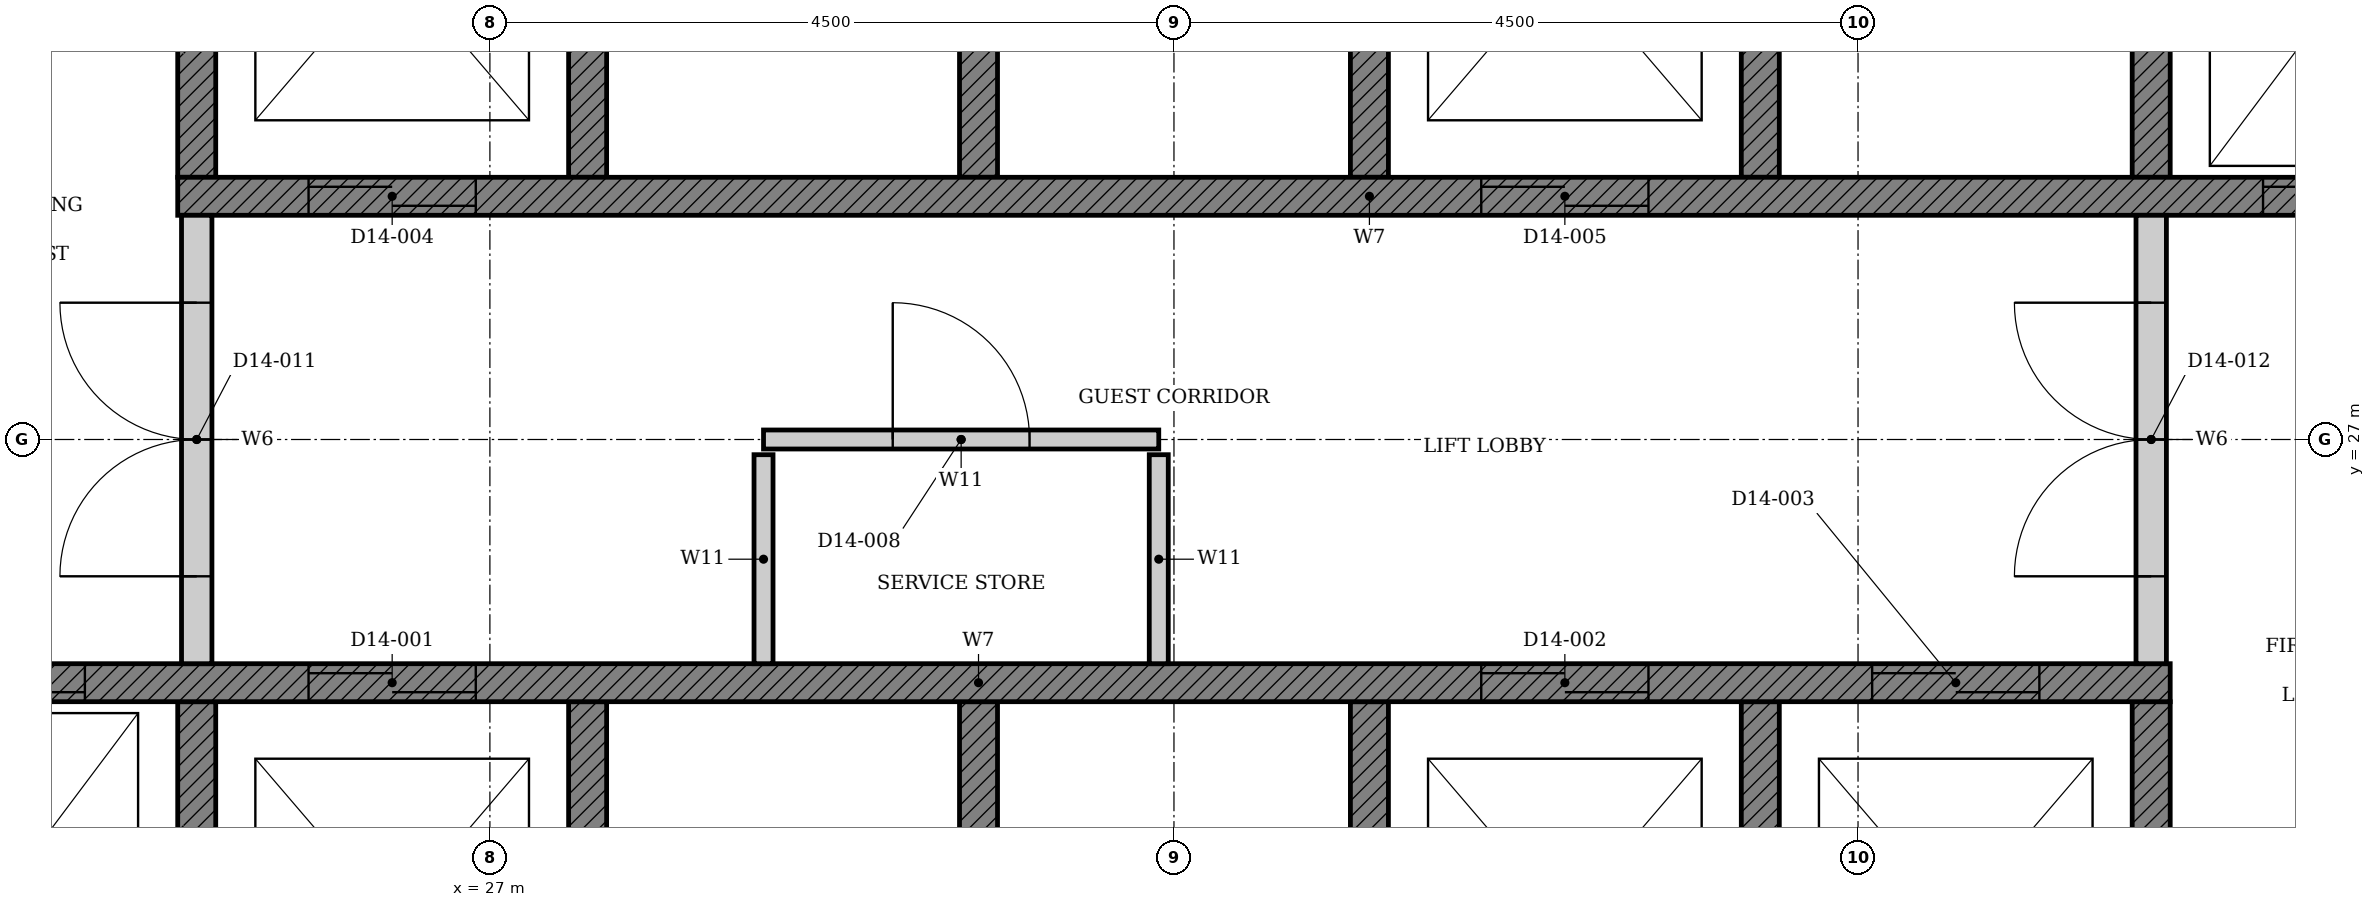
"""IFC4 building model, lengths in metres.
Left out: names, types, materials, properties, quantities, classifications, styles, units other than length and angle.
Written with IfcOpenShell. Run it as: python <this file> out.ifc"""

import sys

from ifc_helpers import new_model, si_unit, direction, frame, frame_2d, origin, place, context, subcontext, project, spatial, polyline, rectangle, outline, extrude, element, fill, save


model = new_model("IFC4")
c1 = context("Model", 3, precision=1e-05, world=origin(), true_north=direction((0.0, 1.0)))
c2 = subcontext(c1, "Body", "Model", "MODEL_VIEW")
j1 = project(units=[si_unit("LENGTHUNIT", "METRE"), si_unit("PLANEANGLEUNIT", "RADIAN")], contexts=[c1])
p1 = place(None, origin())
s1 = spatial("IfcSite", under=j1, at=p1, CompositionType="ELEMENT")
p2 = place(p1, origin())
s2 = spatial("IfcBuilding", under=s1, at=p2, CompositionType="ELEMENT")
p3 = place(p2, frame((0.0, 0.0, 63.6)))
s3 = spatial("IfcBuildingStorey", under=s2, at=p3, CompositionType="ELEMENT", Elevation=63.6)
p4 = place(p3, origin())
e1 = element("IfcWall", 1, at=p4, inside=s3, PredefinedType="SHEAR", context=c2, shape_type="SweptSolid", body=[
    extrude(outline(polyline([(22.375, 22.35), (38.053, 22.35), (38.053, 25.275), (37.803, 25.275), (37.803, 22.65), (35.482, 22.65), (35.482, 25.275), (35.232, 25.275), (35.232, 22.65), (32.911, 22.65), (32.911, 25.275), (32.661, 25.275), (32.661, 22.65), (30.339, 22.65), (30.339, 25.275), (30.089, 25.275), (30.089, 22.65), (27.768, 22.65), (27.768, 25.275), (27.518, 25.275), (27.518, 22.65), (25.197, 22.65), (25.197, 25.275), (24.947, 25.275), (24.947, 22.65), (22.625, 22.65), (22.625, 25.275), (22.375, 25.275), (22.375, 22.35)])), origin(), (0.0, 0.0, 1.0), 3.3),
])
p5 = place(p3, origin())
e2 = element("IfcWall", 2, at=p5, inside=s3, PredefinedType="SHEAR", context=c2, shape_type="SweptSolid", body=[
    extrude(outline(polyline([(24.947, 28.725), (25.197, 28.725), (25.197, 31.35), (27.518, 31.35), (27.518, 28.725), (27.768, 28.725), (27.768, 31.35), (30.089, 31.35), (30.089, 28.725), (30.339, 28.725), (30.339, 31.35), (32.661, 31.35), (32.661, 28.725), (32.911, 28.725), (32.911, 31.35), (35.232, 31.35), (35.232, 28.725), (35.482, 28.725), (35.482, 31.35), (37.803, 31.35), (37.803, 28.725), (38.053, 28.725), (38.053, 31.35), (40.375, 31.35), (40.375, 28.725), (40.625, 28.725), (40.625, 31.65), (24.947, 31.65), (24.947, 28.725)])), origin(), (0.0, 0.0, 1.0), 3.3),
])
p6 = place(p3, frame((22.375, 25.4, 0.0), z_axis=(0.0, 0.0, 1.0), x_axis=(1.0, 0.0, 0.0)))
e3 = element("IfcWall", 3, at=p6, inside=s3, PredefinedType="SHEAR", context=c2, shape_type="SweptSolid", body=[
    extrude(rectangle(XDim=15.678, YDim=0.25, at=frame_2d((7.839, 0.0))), origin(), (0.0, 0.0, 1.0), 3.3),
])
p7 = place(p6, frame((3.432, 0.0, 0.0)))
e4 = element("IfcOpeningElement", 4, at=p7, cuts=e3, PredefinedType="OPENING", context=c2, shape_type="SweptSolid", body=[
    extrude(rectangle(XDim=1.1, YDim=2.1, at=frame_2d((0.55, 1.05))), frame((0.0, 0.135, 0.0), z_axis=(0.0, -1.0, 0.0), x_axis=(1.0, 0.0, 0.0)), (0.0, 0.0, 1.0), 0.27),
])
p8 = place(p6, frame((11.146, 0.0, 0.0)))
e5 = element("IfcOpeningElement", 5, at=p8, cuts=e3, PredefinedType="OPENING", context=c2, shape_type="SweptSolid", body=[
    extrude(rectangle(XDim=1.1, YDim=2.1, at=frame_2d((0.55, 1.05))), frame((0.0, 0.135, 0.0), z_axis=(0.0, -1.0, 0.0), x_axis=(1.0, 0.0, 0.0)), (0.0, 0.0, 1.0), 0.27),
])
p9 = place(p6, frame((13.718, 0.0, 0.0)))
e6 = element("IfcOpeningElement", 6, at=p9, cuts=e3, PredefinedType="OPENING", context=c2, shape_type="SweptSolid", body=[
    extrude(rectangle(XDim=1.1, YDim=2.1, at=frame_2d((0.55, 1.05))), frame((0.0, 0.135, 0.0), z_axis=(0.0, -1.0, 0.0), x_axis=(1.0, 0.0, 0.0)), (0.0, 0.0, 1.0), 0.27),
])
p10 = place(p6, frame((0.861, 0.0, 0.0)))
e7 = element("IfcOpeningElement", 7, at=p10, cuts=e3, PredefinedType="OPENING", context=c2, shape_type="SweptSolid", body=[
    extrude(rectangle(XDim=1.1, YDim=2.1, at=frame_2d((0.55, 1.05))), frame((0.0, 0.135, 0.0), z_axis=(0.0, -1.0, 0.0), x_axis=(1.0, 0.0, 0.0)), (0.0, 0.0, 1.0), 0.27),
])
p11 = place(p3, frame((24.947, 28.6, 0.0), z_axis=(0.0, 0.0, 1.0), x_axis=(1.0, 0.0, 0.0)))
e8 = element("IfcWall", 8, at=p11, inside=s3, PredefinedType="SHEAR", context=c2, shape_type="SweptSolid", body=[
    extrude(rectangle(XDim=15.678, YDim=0.25, at=frame_2d((7.839, 0.0))), origin(), (0.0, 0.0, 1.0), 3.3),
])
p12 = place(p11, frame((0.861, 0.0, 0.0)))
e9 = element("IfcOpeningElement", 9, at=p12, cuts=e8, PredefinedType="OPENING", context=c2, shape_type="SweptSolid", body=[
    extrude(rectangle(XDim=1.1, YDim=2.1, at=frame_2d((0.55, 1.05))), frame((0.0, 0.135, 0.0), z_axis=(0.0, -1.0, 0.0), x_axis=(1.0, 0.0, 0.0)), (0.0, 0.0, 1.0), 0.27),
])
p13 = place(p11, frame((8.575, 0.0, 0.0)))
e10 = element("IfcOpeningElement", 10, at=p13, cuts=e8, PredefinedType="OPENING", context=c2, shape_type="SweptSolid", body=[
    extrude(rectangle(XDim=1.1, YDim=2.1, at=frame_2d((0.55, 1.05))), frame((0.0, 0.135, 0.0), z_axis=(0.0, -1.0, 0.0), x_axis=(1.0, 0.0, 0.0)), (0.0, 0.0, 1.0), 0.27),
])
p14 = place(p11, frame((13.718, 0.0, 0.0)))
e11 = element("IfcOpeningElement", 11, at=p14, cuts=e8, PredefinedType="OPENING", context=c2, shape_type="SweptSolid", body=[
    extrude(rectangle(XDim=1.1, YDim=2.1, at=frame_2d((0.55, 1.05))), frame((0.0, 0.135, 0.0), z_axis=(0.0, -1.0, 0.0), x_axis=(1.0, 0.0, 0.0)), (0.0, 0.0, 1.0), 0.27),
])
p15 = place(p3, frame((28.8, 27.0, 0.0), z_axis=(0.0, 0.0, 1.0), x_axis=(1.0, 0.0, 0.0)))
e12 = element("IfcWall", 12, at=p15, inside=s3, PredefinedType="PARTITIONING", context=c2, shape_type="SweptSolid", body=[
    extrude(rectangle(XDim=2.6, YDim=0.125, at=frame_2d((1.3, 0.0))), origin(), (0.0, 0.0, 1.0), 3.3),
])
p16 = place(p15, frame((0.85, 0.0, 0.0)))
e13 = element("IfcOpeningElement", 13, at=p16, cuts=e12, PredefinedType="OPENING", context=c2, shape_type="SweptSolid", body=[
    extrude(rectangle(XDim=0.9, YDim=2.1, at=frame_2d((0.45, 1.05))), frame((0.0, 0.073, 0.0), z_axis=(0.0, -1.0, 0.0), x_axis=(1.0, 0.0, 0.0)), (0.0, 0.0, 1.0), 0.145),
])
for number, where, z_axis, x_axis in (
    (14, (28.8, 25.525, 0.0), (0.0, 0.0, 1.0), (0.0, 1.0, 0.0)),
    (15, (31.4, 25.525, 0.0), (0.0, 0.0, 1.0), (0.0, 1.0, 0.0)),
):
    element("IfcWall", number, at=place(p3, frame(where, z_axis=z_axis, x_axis=x_axis)), inside=s3, PredefinedType="PARTITIONING", context=c2, shape_type="SweptSolid", body=[
        extrude(rectangle(XDim=1.375, YDim=0.125, at=frame_2d((0.688, 0.0))), origin(), (0.0, 0.0, 1.0), 3.3),
    ])
p17 = place(p3, frame((25.072, 25.525, 0.0), z_axis=(0.0, 0.0, 1.0), x_axis=(0.0, 1.0, 0.0)))
e16 = element("IfcWall", 16, at=p17, inside=s3, PredefinedType="PARTITIONING", context=c2, shape_type="SweptSolid", body=[
    extrude(rectangle(XDim=2.95, YDim=0.2, at=frame_2d((1.475, 0.0))), origin(), (0.0, 0.0, 1.0), 3.3),
])
p18 = place(p17, frame((0.575, 0.0, 0.0)))
e17 = element("IfcOpeningElement", 17, at=p18, cuts=e16, PredefinedType="OPENING", context=c2, shape_type="SweptSolid", body=[
    extrude(rectangle(XDim=1.8, YDim=2.1, at=frame_2d((0.9, 1.05))), frame((0.0, 0.11, 0.0), z_axis=(0.0, -1.0, 0.0), x_axis=(1.0, 0.0, 0.0)), (0.0, 0.0, 1.0), 0.22),
])
p19 = place(p3, frame((37.928, 25.525, 0.0), z_axis=(0.0, 0.0, 1.0), x_axis=(0.0, 1.0, 0.0)))
e18 = element("IfcWall", 18, at=p19, inside=s3, PredefinedType="PARTITIONING", context=c2, shape_type="SweptSolid", body=[
    extrude(rectangle(XDim=2.95, YDim=0.2, at=frame_2d((1.475, 0.0))), origin(), (0.0, 0.0, 1.0), 3.3),
])
p20 = place(p19, frame((0.575, 0.0, 0.0)))
e19 = element("IfcOpeningElement", 19, at=p20, cuts=e18, PredefinedType="OPENING", context=c2, shape_type="SweptSolid", body=[
    extrude(rectangle(XDim=1.8, YDim=2.1, at=frame_2d((0.9, 1.05))), frame((0.0, 0.11, 0.0), z_axis=(0.0, -1.0, 0.0), x_axis=(1.0, 0.0, 0.0)), (0.0, 0.0, 1.0), 0.22),
])
p21 = place(p7, origin())
e20 = element("IfcDoor", 20, at=p21, inside=s3, OperationType="DOUBLE_DOOR_SLIDING", PredefinedType="DOOR", context=c2, shape_type="SweptSolid", body=[
    extrude(rectangle(XDim=1.1, YDim=2.1, at=frame_2d((0.55, 1.05))), frame((0.0, 0.025, 0.0), z_axis=(0.0, -1.0, 0.0), x_axis=(1.0, 0.0, 0.0)), (0.0, 0.0, 1.0), 0.05),
])
fill(e4, e20)
p22 = place(p8, origin())
e21 = element("IfcDoor", 21, at=p22, inside=s3, OperationType="DOUBLE_DOOR_SLIDING", PredefinedType="DOOR", context=c2, shape_type="SweptSolid", body=[
    extrude(rectangle(XDim=1.1, YDim=2.1, at=frame_2d((0.55, 1.05))), frame((0.0, 0.025, 0.0), z_axis=(0.0, -1.0, 0.0), x_axis=(1.0, 0.0, 0.0)), (0.0, 0.0, 1.0), 0.05),
])
fill(e5, e21)
p23 = place(p9, origin())
e22 = element("IfcDoor", 22, at=p23, inside=s3, OperationType="DOUBLE_DOOR_SLIDING", PredefinedType="DOOR", context=c2, shape_type="SweptSolid", body=[
    extrude(rectangle(XDim=1.1, YDim=2.1, at=frame_2d((0.55, 1.05))), frame((0.0, 0.025, 0.0), z_axis=(0.0, -1.0, 0.0), x_axis=(1.0, 0.0, 0.0)), (0.0, 0.0, 1.0), 0.05),
])
fill(e6, e22)
p24 = place(p12, origin())
e23 = element("IfcDoor", 23, at=p24, inside=s3, OperationType="DOUBLE_DOOR_SLIDING", PredefinedType="DOOR", context=c2, shape_type="SweptSolid", body=[
    extrude(rectangle(XDim=1.1, YDim=2.1, at=frame_2d((0.55, 1.05))), frame((0.0, 0.025, 0.0), z_axis=(0.0, -1.0, 0.0), x_axis=(1.0, 0.0, 0.0)), (0.0, 0.0, 1.0), 0.05),
])
fill(e9, e23)
p25 = place(p13, origin())
e24 = element("IfcDoor", 24, at=p25, inside=s3, OperationType="DOUBLE_DOOR_SLIDING", PredefinedType="DOOR", context=c2, shape_type="SweptSolid", body=[
    extrude(rectangle(XDim=1.1, YDim=2.1, at=frame_2d((0.55, 1.05))), frame((0.0, 0.025, 0.0), z_axis=(0.0, -1.0, 0.0), x_axis=(1.0, 0.0, 0.0)), (0.0, 0.0, 1.0), 0.05),
])
fill(e10, e24)
p26 = place(p10, origin())
e25 = element("IfcDoor", 25, at=p26, inside=s3, OperationType="DOUBLE_DOOR_SLIDING", PredefinedType="DOOR", context=c2, shape_type="SweptSolid", body=[
    extrude(rectangle(XDim=1.1, YDim=2.1, at=frame_2d((0.55, 1.05))), frame((0.0, 0.025, 0.0), z_axis=(0.0, -1.0, 0.0), x_axis=(1.0, 0.0, 0.0)), (0.0, 0.0, 1.0), 0.05),
])
fill(e7, e25)
p27 = place(p14, origin())
e26 = element("IfcDoor", 26, at=p27, inside=s3, OperationType="DOUBLE_DOOR_SLIDING", PredefinedType="DOOR", context=c2, shape_type="SweptSolid", body=[
    extrude(rectangle(XDim=1.1, YDim=2.1, at=frame_2d((0.55, 1.05))), frame((0.0, 0.025, 0.0), z_axis=(0.0, -1.0, 0.0), x_axis=(1.0, 0.0, 0.0)), (0.0, 0.0, 1.0), 0.05),
])
fill(e11, e26)
p28 = place(p16, origin())
e27 = element("IfcDoor", 27, at=p28, inside=s3, OperationType="SINGLE_SWING_LEFT", PredefinedType="DOOR", context=c2, shape_type="SweptSolid", body=[
    extrude(rectangle(XDim=0.9, YDim=2.1, at=frame_2d((0.45, 1.05))), frame((0.0, 0.025, 0.0), z_axis=(0.0, -1.0, 0.0), x_axis=(1.0, 0.0, 0.0)), (0.0, 0.0, 1.0), 0.05),
])
fill(e13, e27)
p29 = place(p18, origin())
e28 = element("IfcDoor", 28, at=p29, inside=s3, OperationType="DOUBLE_DOOR_SINGLE_SWING", PredefinedType="DOOR", context=c2, shape_type="SweptSolid", body=[
    extrude(rectangle(XDim=1.8, YDim=2.1, at=frame_2d((0.9, 1.05))), frame((0.0, 0.025, 0.0), z_axis=(0.0, -1.0, 0.0), x_axis=(1.0, 0.0, 0.0)), (0.0, 0.0, 1.0), 0.05),
])
fill(e17, e28)
p30 = place(p20, origin())
e29 = element("IfcDoor", 29, at=p30, inside=s3, OperationType="DOUBLE_DOOR_SINGLE_SWING", PredefinedType="DOOR", context=c2, shape_type="SweptSolid", body=[
    extrude(rectangle(XDim=1.8, YDim=2.1, at=frame_2d((0.9, 1.05))), frame((0.0, 0.025, 0.0), z_axis=(0.0, -1.0, 0.0), x_axis=(1.0, 0.0, 0.0)), (0.0, 0.0, 1.0), 0.05),
])
fill(e19, e29)
save(model, sys.argv[1])
